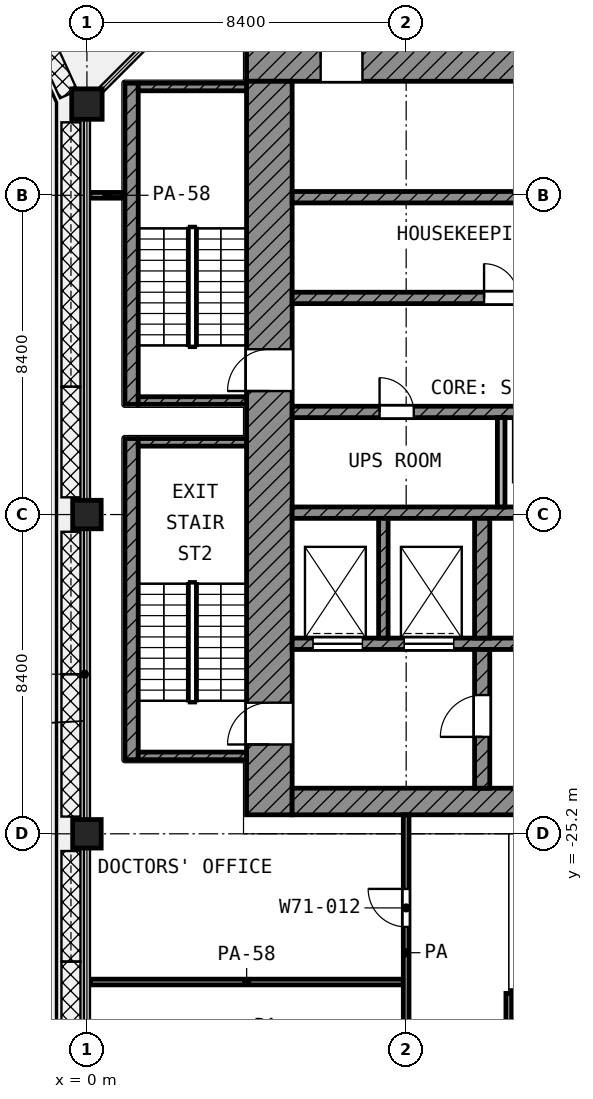
"""IFC4 building model, lengths in metres.
Left out: names, types, materials, properties, quantities, classifications, styles, units other than length and angle.
Written with IfcOpenShell. Run it as: python <this file> out.ifc"""

import sys

from ifc_helpers import new_model, si_unit, direction, frame, frame_2d, origin, origin_2d, place, context, subcontext, project, spatial, rectangle, extrude, element, fill, save


model = new_model("IFC4")
c1 = context("Model", 3, precision=1e-05, world=origin(), true_north=direction((0.0, 1.0)))
c2 = subcontext(c1, "Body", "Model", "MODEL_VIEW")
j1 = project(units=[si_unit("LENGTHUNIT", "METRE"), si_unit("PLANEANGLEUNIT", "RADIAN")], contexts=[c1])
p1 = place(None, origin())
s1 = spatial("IfcSite", under=j1, at=p1, CompositionType="ELEMENT")
p2 = place(p1, origin())
s2 = spatial("IfcBuilding", under=s1, at=p2, CompositionType="ELEMENT")
p3 = place(p2, frame((0.0, 0.0, 307.0)))
s3 = spatial("IfcBuildingStorey", under=s2, at=p3, CompositionType="ELEMENT", Elevation=307.0)
p4 = place(p3, frame((0.0, -6.0, 0.0), z_axis=(0.0, 0.0, 1.0), x_axis=(1.0, 0.0, 0.0)))
e1 = element("IfcColumn", 1, at=p4, inside=s3, PredefinedType="COLUMN", context=c2, shape_type="SweptSolid", body=[
    extrude(rectangle(XDim=0.8, YDim=0.8, at=origin_2d()), origin(), (0.0, 0.0, 1.0), 4.2),
])
for number, where, z_axis, x_axis in (
    (2, (0.0, -16.8, 0.0), (0.0, 0.0, 1.0), (1.0, 0.0, 0.0)),
    (3, (0.0, -25.2, 0.0), (0.0, 0.0, 1.0), (1.0, 0.0, 0.0)),
):
    element("IfcColumn", number, at=place(p3, frame(where, z_axis=z_axis, x_axis=x_axis)), inside=s3, PredefinedType="COLUMN", context=c2, shape_type="SweptSolid", body=[
        extrude(rectangle(XDim=0.75, YDim=0.75, at=origin_2d()), origin(), (0.0, 0.0, 1.0), 4.2),
    ])
p5 = place(p3, frame((4.2, -4.8, 0.0), z_axis=(0.0, 0.0, 1.0), x_axis=(1.0, 0.0, 0.0)))
e4 = element("IfcWall", 4, at=p5, inside=s3, PredefinedType="SHEAR", context=c2, shape_type="SweptSolid", body=[
    extrude(rectangle(XDim=20.5, YDim=1.2, at=frame_2d((10.25, 0.0))), origin(), (0.0, 0.0, 1.0), 3.6),
])
p6 = place(p5, frame((1.95, 0.0, 0.0)))
e5 = element("IfcOpeningElement", 5, at=p6, cuts=e4, PredefinedType="OPENING", context=c2, shape_type="SweptSolid", body=[
    extrude(rectangle(XDim=1.1, YDim=2.1, at=frame_2d((0.55, 1.05))), frame((0.0, 0.61, 0.0), z_axis=(0.0, -1.0, 0.0), x_axis=(1.0, 0.0, 0.0)), (0.0, 0.0, 1.0), 1.22),
])
p7 = place(p5, frame((17.95, 0.0, 0.0)))
e6 = element("IfcOpeningElement", 6, at=p7, cuts=e4, PredefinedType="OPENING", context=c2, shape_type="SweptSolid", body=[
    extrude(rectangle(XDim=1.1, YDim=2.1, at=frame_2d((0.55, 1.05))), frame((0.0, 0.61, 0.0), z_axis=(0.0, -1.0, 0.0), x_axis=(1.0, 0.0, 0.0)), (0.0, 0.0, 1.0), 1.22),
])
p8 = place(p3, frame((4.8, -24.7, 0.0), z_axis=(0.0, 0.0, 1.0), x_axis=(0.0, 1.0, 0.0)))
e7 = element("IfcWall", 7, at=p8, inside=s3, PredefinedType="SHEAR", context=c2, shape_type="SweptSolid", body=[
    extrude(rectangle(XDim=19.3, YDim=1.2, at=frame_2d((9.65, 0.0))), origin(), (0.0, 0.0, 1.0), 3.6),
])
p9 = place(p8, frame((11.15, 0.0, 0.0)))
e8 = element("IfcOpeningElement", 8, at=p9, cuts=e7, PredefinedType="OPENING", context=c2, shape_type="SweptSolid", body=[
    extrude(rectangle(XDim=1.1, YDim=2.1, at=frame_2d((0.55, 1.05))), frame((0.0, 0.61, 0.0), z_axis=(0.0, -1.0, 0.0), x_axis=(1.0, 0.0, 0.0)), (0.0, 0.0, 1.0), 1.22),
])
p10 = place(p8, frame((1.85, 0.0, 0.0)))
e9 = element("IfcOpeningElement", 9, at=p10, cuts=e7, PredefinedType="OPENING", context=c2, shape_type="SweptSolid", body=[
    extrude(rectangle(XDim=1.1, YDim=2.1, at=frame_2d((0.55, 1.05))), frame((0.0, 0.61, 0.0), z_axis=(0.0, -1.0, 0.0), x_axis=(1.0, 0.0, 0.0)), (0.0, 0.0, 1.0), 1.22),
])
p11 = place(p3, frame((5.4, -24.35, 0.0), z_axis=(0.0, 0.0, 1.0), x_axis=(1.0, 0.0, 0.0)))
e10 = element("IfcWall", 10, at=p11, inside=s3, PredefinedType="SHEAR", context=c2, shape_type="SweptSolid", body=[
    extrude(rectangle(XDim=18.6, YDim=0.7, at=frame_2d((9.3, 0.0))), origin(), (0.0, 0.0, 1.0), 3.6),
])
p12 = place(p11, frame((6.3, 0.0, 0.0)))
e11 = element("IfcOpeningElement", 11, at=p12, cuts=e10, PredefinedType="OPENING", context=c2, shape_type="SweptSolid", body=[
    extrude(rectangle(XDim=1.8, YDim=2.1, at=frame_2d((0.9, 1.05))), frame((0.0, 0.36, 0.0), z_axis=(0.0, -1.0, 0.0), x_axis=(1.0, 0.0, 0.0)), (0.0, 0.0, 1.0), 0.72),
])
p13 = place(p3, frame((5.4, -8.45, 0.0), z_axis=(0.0, 0.0, 1.0), x_axis=(1.0, 0.0, 0.0)))
e12 = element("IfcWall", 12, at=p13, inside=s3, PredefinedType="SHEAR", context=c2, shape_type="SweptSolid", body=[
    extrude(rectangle(XDim=16.65, YDim=0.3, at=frame_2d((8.325, 0.0))), origin(), (0.0, 0.0, 1.0), 3.6),
])
p14 = place(p3, frame((5.4, -11.1, 0.0), z_axis=(0.0, 0.0, 1.0), x_axis=(1.0, 0.0, 0.0)))
e13 = element("IfcWall", 13, at=p14, inside=s3, PredefinedType="SHEAR", context=c2, shape_type="SweptSolid", body=[
    extrude(rectangle(XDim=16.65, YDim=0.3, at=frame_2d((8.325, 0.0))), origin(), (0.0, 0.0, 1.0), 3.6),
])
p15 = place(p14, frame((5.05, 0.0, 0.0)))
e14 = element("IfcOpeningElement", 14, at=p15, cuts=e13, PredefinedType="OPENING", context=c2, shape_type="SweptSolid", body=[
    extrude(rectangle(XDim=0.9, YDim=2.1, at=frame_2d((0.45, 1.05))), frame((0.0, 0.16, 0.0), z_axis=(0.0, -1.0, 0.0), x_axis=(1.0, 0.0, 0.0)), (0.0, 0.0, 1.0), 0.32),
])
p16 = place(p14, frame((13.3, 0.0, 0.0)))
e15 = element("IfcOpeningElement", 15, at=p16, cuts=e13, PredefinedType="OPENING", context=c2, shape_type="SweptSolid", body=[
    extrude(rectangle(XDim=0.9, YDim=2.1, at=frame_2d((0.45, 1.05))), frame((0.0, 0.16, 0.0), z_axis=(0.0, -1.0, 0.0), x_axis=(1.0, 0.0, 0.0)), (0.0, 0.0, 1.0), 0.32),
])
p17 = place(p3, frame((5.4, -14.1, 0.0), z_axis=(0.0, 0.0, 1.0), x_axis=(1.0, 0.0, 0.0)))
e16 = element("IfcWall", 16, at=p17, inside=s3, PredefinedType="SHEAR", context=c2, shape_type="SweptSolid", body=[
    extrude(rectangle(XDim=16.65, YDim=0.3, at=frame_2d((8.325, 0.0))), origin(), (0.0, 0.0, 1.0), 3.6),
])
p18 = place(p17, frame((6.325, 0.0, 0.0)))
e17 = element("IfcOpeningElement", 17, at=p18, cuts=e16, PredefinedType="OPENING", context=c2, shape_type="SweptSolid", body=[
    extrude(rectangle(XDim=1.1, YDim=2.1, at=frame_2d((0.55, 1.05))), frame((0.0, 0.16, 0.0), z_axis=(0.0, -1.0, 0.0), x_axis=(1.0, 0.0, 0.0)), (0.0, 0.0, 1.0), 0.32),
])
p19 = place(p17, frame((9.075, 0.0, 0.0)))
e18 = element("IfcOpeningElement", 18, at=p19, cuts=e16, PredefinedType="OPENING", context=c2, shape_type="SweptSolid", body=[
    extrude(rectangle(XDim=1.1, YDim=2.1, at=frame_2d((0.55, 1.05))), frame((0.0, 0.16, 0.0), z_axis=(0.0, -1.0, 0.0), x_axis=(1.0, 0.0, 0.0)), (0.0, 0.0, 1.0), 0.32),
])
p20 = place(p17, frame((11.825, 0.0, 0.0)))
e19 = element("IfcOpeningElement", 19, at=p20, cuts=e16, PredefinedType="OPENING", context=c2, shape_type="SweptSolid", body=[
    extrude(rectangle(XDim=1.1, YDim=2.1, at=frame_2d((0.55, 1.05))), frame((0.0, 0.16, 0.0), z_axis=(0.0, -1.0, 0.0), x_axis=(1.0, 0.0, 0.0)), (0.0, 0.0, 1.0), 0.32),
])
p21 = place(p17, frame((14.575, 0.0, 0.0)))
e20 = element("IfcOpeningElement", 20, at=p21, cuts=e16, PredefinedType="OPENING", context=c2, shape_type="SweptSolid", body=[
    extrude(rectangle(XDim=1.1, YDim=2.1, at=frame_2d((0.55, 1.05))), frame((0.0, 0.16, 0.0), z_axis=(0.0, -1.0, 0.0), x_axis=(1.0, 0.0, 0.0)), (0.0, 0.0, 1.0), 0.32),
])
p22 = place(p17, frame((2.3, 0.0, 0.0)))
e21 = element("IfcOpeningElement", 21, at=p22, cuts=e16, PredefinedType="OPENING", context=c2, shape_type="SweptSolid", body=[
    extrude(rectangle(XDim=0.9, YDim=2.1, at=frame_2d((0.45, 1.05))), frame((0.0, 0.16, 0.0), z_axis=(0.0, -1.0, 0.0), x_axis=(1.0, 0.0, 0.0)), (0.0, 0.0, 1.0), 0.32),
])
p23 = place(p3, frame((5.4, -16.75, 0.0), z_axis=(0.0, 0.0, 1.0), x_axis=(1.0, 0.0, 0.0)))
e22 = element("IfcWall", 22, at=p23, inside=s3, PredefinedType="SHEAR", context=c2, shape_type="SweptSolid", body=[
    extrude(rectangle(XDim=16.65, YDim=0.3, at=frame_2d((8.325, 0.0))), origin(), (0.0, 0.0, 1.0), 3.6),
])
p24 = place(p3, frame((5.4, -20.2, 0.0), z_axis=(0.0, 0.0, 1.0), x_axis=(1.0, 0.0, 0.0)))
e23 = element("IfcWall", 23, at=p24, inside=s3, PredefinedType="SHEAR", context=c2, shape_type="SweptSolid", body=[
    extrude(rectangle(XDim=14.65, YDim=0.3, at=frame_2d((7.325, 0.0))), origin(), (0.0, 0.0, 1.0), 3.6),
])
p25 = place(p24, frame((10.55, 0.0, 0.0)))
e24 = element("IfcOpeningElement", 24, at=p25, cuts=e23, PredefinedType="OPENING", context=c2, shape_type="SweptSolid", body=[
    extrude(rectangle(XDim=1.3, YDim=2.1, at=frame_2d((0.65, 1.05))), frame((0.0, 0.16, 0.0), z_axis=(0.0, -1.0, 0.0), x_axis=(1.0, 0.0, 0.0)), (0.0, 0.0, 1.0), 0.32),
])
p26 = place(p24, frame((12.95, 0.0, 0.0)))
e25 = element("IfcOpeningElement", 25, at=p26, cuts=e23, PredefinedType="OPENING", context=c2, shape_type="SweptSolid", body=[
    extrude(rectangle(XDim=1.3, YDim=2.1, at=frame_2d((0.65, 1.05))), frame((0.0, 0.16, 0.0), z_axis=(0.0, -1.0, 0.0), x_axis=(1.0, 0.0, 0.0)), (0.0, 0.0, 1.0), 0.32),
])
p27 = place(p24, frame((0.55, 0.0, 0.0)))
e26 = element("IfcOpeningElement", 26, at=p27, cuts=e23, PredefinedType="OPENING", context=c2, shape_type="SweptSolid", body=[
    extrude(rectangle(XDim=1.3, YDim=2.1, at=frame_2d((0.65, 1.05))), frame((0.0, 0.16, 0.0), z_axis=(0.0, -1.0, 0.0), x_axis=(1.0, 0.0, 0.0)), (0.0, 0.0, 1.0), 0.32),
])
p28 = place(p24, frame((2.95, 0.0, 0.0)))
e27 = element("IfcOpeningElement", 27, at=p28, cuts=e23, PredefinedType="OPENING", context=c2, shape_type="SweptSolid", body=[
    extrude(rectangle(XDim=1.3, YDim=2.1, at=frame_2d((0.65, 1.05))), frame((0.0, 0.16, 0.0), z_axis=(0.0, -1.0, 0.0), x_axis=(1.0, 0.0, 0.0)), (0.0, 0.0, 1.0), 0.32),
])
p29 = place(p24, frame((6.55, 0.0, 0.0)))
e28 = element("IfcOpeningElement", 28, at=p29, cuts=e23, PredefinedType="OPENING", context=c2, shape_type="SweptSolid", body=[
    extrude(rectangle(XDim=0.9, YDim=2.1, at=frame_2d((0.45, 1.05))), frame((0.0, 0.16, 0.0), z_axis=(0.0, -1.0, 0.0), x_axis=(1.0, 0.0, 0.0)), (0.0, 0.0, 1.0), 0.32),
])
p30 = place(p24, frame((8.95, 0.0, 0.0)))
e29 = element("IfcOpeningElement", 29, at=p30, cuts=e23, PredefinedType="OPENING", context=c2, shape_type="SweptSolid", body=[
    extrude(rectangle(XDim=0.9, YDim=2.1, at=frame_2d((0.45, 1.05))), frame((0.0, 0.16, 0.0), z_axis=(0.0, -1.0, 0.0), x_axis=(1.0, 0.0, 0.0)), (0.0, 0.0, 1.0), 0.32),
])
p31 = place(p3, frame((10.4, -24.0, 0.0), z_axis=(0.0, 0.0, 1.0), x_axis=(0.0, 1.0, 0.0)))
e30 = element("IfcWall", 30, at=p31, inside=s3, PredefinedType="SHEAR", context=c2, shape_type="SweptSolid", body=[
    extrude(rectangle(XDim=3.65, YDim=0.4, at=frame_2d((1.825, 0.0))), origin(), (0.0, 0.0, 1.0), 3.6),
])
p32 = place(p31, frame((1.35, 0.0, 0.0)))
e31 = element("IfcOpeningElement", 31, at=p32, cuts=e30, PredefinedType="OPENING", context=c2, shape_type="SweptSolid", body=[
    extrude(rectangle(XDim=1.1, YDim=2.1, at=frame_2d((0.55, 1.05))), frame((0.0, 0.21, 0.0), z_axis=(0.0, -1.0, 0.0), x_axis=(1.0, 0.0, 0.0)), (0.0, 0.0, 1.0), 0.42),
])
p33 = place(p3, frame((10.4, -20.05, 0.0), z_axis=(0.0, 0.0, 1.0), x_axis=(0.0, 1.0, 0.0)))
e32 = element("IfcWall", 32, at=p33, inside=s3, PredefinedType="SHEAR", context=c2, shape_type="SweptSolid", body=[
    extrude(rectangle(XDim=3.15, YDim=0.4, at=frame_2d((1.575, 0.0))), origin(), (0.0, 0.0, 1.0), 3.6),
])
p34 = place(p3, frame((7.8, -20.05, 0.0), z_axis=(0.0, 0.0, 1.0), x_axis=(0.0, 1.0, 0.0)))
e33 = element("IfcWall", 33, at=p34, inside=s3, PredefinedType="SHEAR", context=c2, shape_type="SweptSolid", body=[
    extrude(rectangle(XDim=3.15, YDim=0.25, at=frame_2d((1.575, 0.0))), origin(), (0.0, 0.0, 1.0), 3.6),
])
p35 = place(p3, frame((10.9, -16.6, 0.0), z_axis=(0.0, 0.0, 1.0), x_axis=(0.0, 1.0, 0.0)))
e34 = element("IfcWall", 34, at=p35, inside=s3, PredefinedType="PARTITIONING", context=c2, shape_type="SweptSolid", body=[
    extrude(rectangle(XDim=2.35, YDim=0.2, at=frame_2d((1.175, 0.0))), origin(), (0.0, 0.0, 1.0), 3.6),
])
p36 = place(p3, frame((1.175, -13.9, 0.0), z_axis=(0.0, 0.0, 1.0), x_axis=(0.0, 1.0, 0.0)))
e35 = element("IfcWall", 35, at=p36, inside=s3, PredefinedType="SHEAR", context=c2, shape_type="SweptSolid", body=[
    extrude(rectangle(XDim=8.45, YDim=0.35, at=frame_2d((4.225, 0.0))), origin(), (0.0, 0.0, 1.0), 3.6),
])
for number, where, z_axis, x_axis in (
    (36, (1.35, -5.55, 0.0), (0.0, 0.0, 1.0), (1.0, 0.0, 0.0)),
    (37, (1.35, -13.8, 0.0), (0.0, 0.0, 1.0), (1.0, 0.0, 0.0)),
):
    element("IfcWall", number, at=place(p3, frame(where, z_axis=z_axis, x_axis=x_axis)), inside=s3, PredefinedType="SHEAR", context=c2, shape_type="SweptSolid", body=[
        extrude(rectangle(XDim=2.85, YDim=0.2, at=frame_2d((1.425, 0.0))), origin(), (0.0, 0.0, 1.0), 3.6),
    ])
p37 = place(p3, frame((1.175, -23.25, 0.0), z_axis=(0.0, 0.0, 1.0), x_axis=(0.0, 1.0, 0.0)))
e38 = element("IfcWall", 38, at=p37, inside=s3, PredefinedType="SHEAR", context=c2, shape_type="SweptSolid", body=[
    extrude(rectangle(XDim=8.45, YDim=0.35, at=frame_2d((4.225, 0.0))), origin(), (0.0, 0.0, 1.0), 3.6),
])
for number, where, z_axis, x_axis in (
    (39, (1.35, -14.9, 0.0), (0.0, 0.0, 1.0), (1.0, 0.0, 0.0)),
    (40, (1.35, -23.15, 0.0), (0.0, 0.0, 1.0), (1.0, 0.0, 0.0)),
):
    element("IfcWall", number, at=place(p3, frame(where, z_axis=z_axis, x_axis=x_axis)), inside=s3, PredefinedType="SHEAR", context=c2, shape_type="SweptSolid", body=[
        extrude(rectangle(XDim=2.85, YDim=0.2, at=frame_2d((1.425, 0.0))), origin(), (0.0, 0.0, 1.0), 3.6),
    ])
p38 = place(p3, frame((11.175, -29.4, 0.0), z_axis=(0.0, 0.0, 1.0), x_axis=(1.0, 0.0, 0.0)))
e41 = element("IfcWall", 41, at=p38, inside=s3, PredefinedType="PARTITIONING", context=c2, shape_type="SweptSolid", body=[
    extrude(rectangle(XDim=18.15, YDim=0.15, at=frame_2d((9.075, 0.0))), origin(), (0.0, 0.0, 1.0), 3.6),
])
p39 = place(p3, frame((0.08, -29.1, 0.0), z_axis=(0.0, 0.0, 1.0), x_axis=(1.0, 0.0, 0.0)))
e42 = element("IfcWall", 42, at=p39, inside=s3, PredefinedType="PARTITIONING", context=c2, shape_type="SweptSolid", body=[
    extrude(rectangle(XDim=8.245, YDim=0.15, at=frame_2d((4.123, 0.0))), origin(), (0.0, 0.0, 1.0), 2.7),
])
p40 = place(p3, frame((0.08, -8.4, 0.0), z_axis=(0.0, 0.0, 1.0), x_axis=(1.0, 0.0, 0.0)))
e43 = element("IfcWall", 43, at=p40, inside=s3, PredefinedType="PARTITIONING", context=c2, shape_type="SweptSolid", body=[
    extrude(rectangle(XDim=0.89, YDim=0.15, at=frame_2d((0.445, 0.0))), origin(), (0.0, 0.0, 1.0), 2.7),
])
p41 = place(p3, frame((8.4, -31.957, 0.0), z_axis=(0.0, 0.0, 1.0), x_axis=(0.0, 1.0, 0.0)))
e44 = element("IfcWall", 44, at=p41, inside=s3, PredefinedType="PARTITIONING", context=c2, shape_type="SweptSolid", body=[
    extrude(rectangle(XDim=7.257, YDim=0.15, at=frame_2d((3.628, 0.0))), origin(), (0.0, 0.0, 1.0), 3.6),
])
p42 = place(p41, frame((4.307, 0.0, 0.0)))
e45 = element("IfcOpeningElement", 45, at=p42, cuts=e44, PredefinedType="OPENING", context=c2, shape_type="SweptSolid", body=[
    extrude(rectangle(XDim=1.0, YDim=2.1, at=frame_2d((0.5, 1.05))), frame((0.0, 0.085, 0.0), z_axis=(0.0, -1.0, 0.0), x_axis=(1.0, 0.0, 0.0)), (0.0, 0.0, 1.0), 0.17),
])
p43 = place(p3, frame((11.1, -41.92, 0.0), z_axis=(0.0, 0.0, 1.0), x_axis=(0.0, 1.0, 0.0)))
e46 = element("IfcWall", 46, at=p43, inside=s3, PredefinedType="PARTITIONING", context=c2, shape_type="SweptSolid", body=[
    extrude(rectangle(XDim=12.52, YDim=0.15, at=frame_2d((6.26, 0.0))), origin(), (0.0, 0.0, 1.0), 3.6),
])
p44 = place(p43, frame((9.82, 0.0, 0.0)))
e47 = element("IfcOpeningElement", 47, at=p44, cuts=e46, PredefinedType="OPENING", context=c2, shape_type="SweptSolid", body=[
    extrude(rectangle(XDim=1.2, YDim=2.1, at=frame_2d((0.6, 1.05))), frame((0.0, 0.085, 0.0), z_axis=(0.0, -1.0, 0.0), x_axis=(1.0, 0.0, 0.0)), (0.0, 0.0, 1.0), 0.17),
])
p45 = place(p43, frame((6.02, 0.0, 0.0)))
e48 = element("IfcOpeningElement", 48, at=p45, cuts=e46, PredefinedType="OPENING", context=c2, shape_type="SweptSolid", body=[
    extrude(rectangle(XDim=1.0, YDim=2.1, at=frame_2d((0.5, 1.05))), frame((0.0, 0.085, 0.0), z_axis=(0.0, -1.0, 0.0), x_axis=(1.0, 0.0, 0.0)), (0.0, 0.0, 1.0), 0.17),
])
p46 = place(p43, frame((1.82, 0.0, 0.0)))
e49 = element("IfcOpeningElement", 49, at=p46, cuts=e46, PredefinedType="OPENING", context=c2, shape_type="SweptSolid", body=[
    extrude(rectangle(XDim=1.0, YDim=2.1, at=frame_2d((0.5, 1.05))), frame((0.0, 0.085, 0.0), z_axis=(0.0, -1.0, 0.0), x_axis=(1.0, 0.0, 0.0)), (0.0, 0.0, 1.0), 0.17),
])
p47 = place(p27, origin())
e50 = element("IfcDoor", 50, at=p47, inside=s3, OperationType="DOUBLE_DOOR_SLIDING", PredefinedType="DOOR", context=c2, shape_type="SweptSolid", body=[
    extrude(rectangle(XDim=1.3, YDim=2.1, at=frame_2d((0.65, 1.05))), frame((0.0, 0.025, 0.0), z_axis=(0.0, -1.0, 0.0), x_axis=(1.0, 0.0, 0.0)), (0.0, 0.0, 1.0), 0.05),
])
fill(e26, e50)
p48 = place(p28, origin())
e51 = element("IfcDoor", 51, at=p48, inside=s3, OperationType="DOUBLE_DOOR_SLIDING", PredefinedType="DOOR", context=c2, shape_type="SweptSolid", body=[
    extrude(rectangle(XDim=1.3, YDim=2.1, at=frame_2d((0.65, 1.05))), frame((0.0, 0.025, 0.0), z_axis=(0.0, -1.0, 0.0), x_axis=(1.0, 0.0, 0.0)), (0.0, 0.0, 1.0), 0.05),
])
fill(e27, e51)
p49 = place(p9, origin())
e52 = element("IfcDoor", 52, at=p49, inside=s3, OperationType="SINGLE_SWING_LEFT", PredefinedType="DOOR", context=c2, shape_type="SweptSolid", body=[
    extrude(rectangle(XDim=1.1, YDim=2.1, at=frame_2d((0.55, 1.05))), frame((0.0, 0.025, 0.0), z_axis=(0.0, -1.0, 0.0), x_axis=(1.0, 0.0, 0.0)), (0.0, 0.0, 1.0), 0.05),
])
fill(e8, e52)
p50 = place(p10, origin())
e53 = element("IfcDoor", 53, at=p50, inside=s3, OperationType="SINGLE_SWING_LEFT", PredefinedType="DOOR", context=c2, shape_type="SweptSolid", body=[
    extrude(rectangle(XDim=1.1, YDim=2.1, at=frame_2d((0.55, 1.05))), frame((0.0, 0.025, 0.0), z_axis=(0.0, -1.0, 0.0), x_axis=(1.0, 0.0, 0.0)), (0.0, 0.0, 1.0), 0.05),
])
fill(e9, e53)
p51 = place(p6, origin())
e54 = element("IfcDoor", 54, at=p51, inside=s3, OperationType="SINGLE_SWING_LEFT", PredefinedType="DOOR", context=c2, shape_type="SweptSolid", body=[
    extrude(rectangle(XDim=1.1, YDim=2.1, at=frame_2d((0.55, 1.05))), frame((0.0, 0.025, 0.0), z_axis=(0.0, -1.0, 0.0), x_axis=(1.0, 0.0, 0.0)), (0.0, 0.0, 1.0), 0.05),
])
fill(e5, e54)
p52 = place(p32, origin())
e55 = element("IfcDoor", 55, at=p52, inside=s3, OperationType="SINGLE_SWING_LEFT", PredefinedType="DOOR", context=c2, shape_type="SweptSolid", body=[
    extrude(rectangle(XDim=1.1, YDim=2.1, at=frame_2d((0.55, 1.05))), frame((0.0, 0.025, 0.0), z_axis=(0.0, -1.0, 0.0), x_axis=(1.0, 0.0, 0.0)), (0.0, 0.0, 1.0), 0.05),
])
fill(e31, e55)
p53 = place(p15, origin())
e56 = element("IfcDoor", 56, at=p53, inside=s3, OperationType="SINGLE_SWING_LEFT", PredefinedType="DOOR", context=c2, shape_type="SweptSolid", body=[
    extrude(rectangle(XDim=0.9, YDim=2.1, at=frame_2d((0.45, 1.05))), frame((0.0, 0.025, 0.0), z_axis=(0.0, -1.0, 0.0), x_axis=(1.0, 0.0, 0.0)), (0.0, 0.0, 1.0), 0.05),
])
fill(e14, e56)
p54 = place(p22, origin())
e57 = element("IfcDoor", 57, at=p54, inside=s3, OperationType="SINGLE_SWING_LEFT", PredefinedType="DOOR", context=c2, shape_type="SweptSolid", body=[
    extrude(rectangle(XDim=0.9, YDim=2.1, at=frame_2d((0.45, 1.05))), frame((0.0, 0.025, 0.0), z_axis=(0.0, -1.0, 0.0), x_axis=(1.0, 0.0, 0.0)), (0.0, 0.0, 1.0), 0.05),
])
fill(e21, e57)
p55 = place(p42, origin())
e58 = element("IfcDoor", 58, at=p55, inside=s3, OperationType="SINGLE_SWING_RIGHT", PredefinedType="DOOR", context=c2, shape_type="SweptSolid", body=[
    extrude(rectangle(XDim=1.0, YDim=2.1, at=frame_2d((0.5, 1.05))), frame((0.0, 0.025, 0.0), z_axis=(0.0, -1.0, 0.0), x_axis=(1.0, 0.0, 0.0)), (0.0, 0.0, 1.0), 0.05),
])
fill(e45, e58)
save(model, sys.argv[1])
